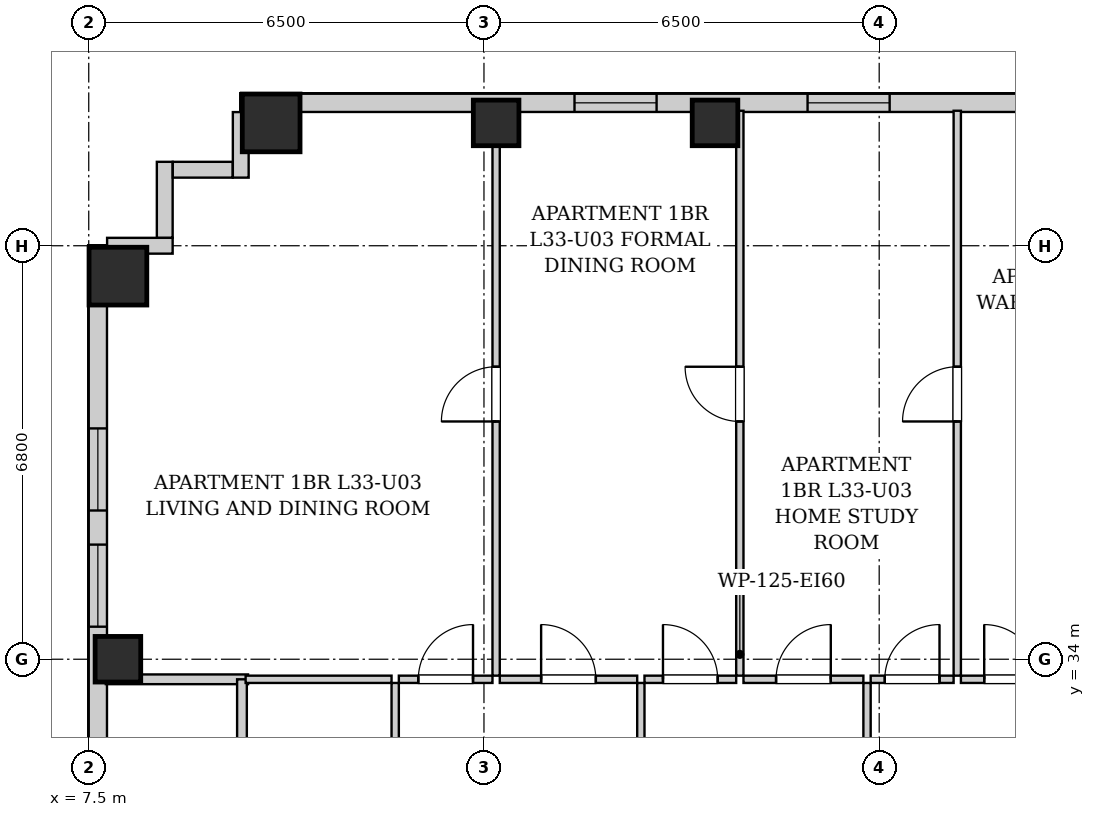
"""IFC4 building model, lengths in metres.
Left out: names, types, materials, properties, quantities, classifications, styles, units other than length and angle.
Written with IfcOpenShell. Run it as: python <this file> out.ifc"""

import sys

from ifc_helpers import new_model, si_unit, direction, frame, frame_2d, origin, origin_2d, place, context, subcontext, project, spatial, rectangle, extrude, element, fill, save


model = new_model("IFC4")
c1 = context("Model", 3, precision=1e-05, world=origin(), true_north=direction((0.0, 1.0)))
c2 = subcontext(c1, "Body", "Model", "MODEL_VIEW")
j1 = project(units=[si_unit("LENGTHUNIT", "METRE"), si_unit("PLANEANGLEUNIT", "RADIAN")], contexts=[c1])
p1 = place(None, origin())
s1 = spatial("IfcSite", under=j1, at=p1, CompositionType="ELEMENT")
p2 = place(p1, origin())
s2 = spatial("IfcBuilding", under=s1, at=p2, CompositionType="ELEMENT")
p3 = place(p2, frame((0.0, 0.0, 116.7)))
s3 = spatial("IfcBuildingStorey", under=s2, at=p3, CompositionType="ELEMENT", Elevation=116.7)
p4 = place(p3, frame((10.5, 42.82, 0.0), z_axis=(0.0, 0.0, 1.0), x_axis=(1.0, 0.0, 0.0)))
e1 = element("IfcColumn", 1, at=p4, inside=s3, PredefinedType="COLUMN", context=c2, shape_type="SweptSolid", body=[
    extrude(rectangle(XDim=0.95, YDim=0.95, at=origin_2d()), origin(), (0.0, 0.0, 1.0), 3.2),
])
for number, where, z_axis, x_axis in (
    (2, (14.2, 42.82, 0.0), (0.0, 0.0, 1.0), (1.0, 0.0, 0.0)),
    (3, (17.8, 42.82, 0.0), (0.0, 0.0, 1.0), (1.0, 0.0, 0.0)),
    (4, (7.98, 34.0, 0.0), (0.0, 0.0, 1.0), (1.0, 0.0, 0.0)),
):
    element("IfcColumn", number, at=place(p3, frame(where, z_axis=z_axis, x_axis=x_axis)), inside=s3, PredefinedType="COLUMN", context=c2, shape_type="SweptSolid", body=[
        extrude(rectangle(XDim=0.75, YDim=0.75, at=origin_2d()), origin(), (0.0, 0.0, 1.0), 3.2),
    ])
p5 = place(p3, frame((7.98, 40.3, 0.0), z_axis=(0.0, 0.0, 1.0), x_axis=(1.0, 0.0, 0.0)))
e5 = element("IfcColumn", 5, at=p5, inside=s3, PredefinedType="COLUMN", context=c2, shape_type="SweptSolid", body=[
    extrude(rectangle(XDim=0.95, YDim=0.95, at=origin_2d()), origin(), (0.0, 0.0, 1.0), 3.2),
])
p6 = place(p3, frame((10.0, 43.15, 0.0), z_axis=(0.0, 0.0, 1.0), x_axis=(1.0, 0.0, 0.0)))
e6 = element("IfcWall", 6, at=p6, inside=s3, PredefinedType="SOLIDWALL", context=c2, shape_type="SweptSolid", body=[
    extrude(rectangle(XDim=21.95, YDim=0.3, at=frame_2d((10.975, 0.0))), origin(), (0.0, 0.0, 1.0), 2.88),
])
p7 = place(p6, frame((5.489, 0.0, 0.55)))
e7 = element("IfcOpeningElement", 7, at=p7, cuts=e6, PredefinedType="OPENING", context=c2, shape_type="SweptSolid", body=[
    extrude(rectangle(XDim=1.35, YDim=1.2, at=frame_2d((0.675, 0.6))), frame((0.0, 0.16, 0.0), z_axis=(0.0, -1.0, 0.0), x_axis=(1.0, 0.0, 0.0)), (0.0, 0.0, 1.0), 0.32),
])
p8 = place(p6, frame((9.322, 0.0, 0.55)))
e8 = element("IfcOpeningElement", 8, at=p8, cuts=e6, PredefinedType="OPENING", context=c2, shape_type="SweptSolid", body=[
    extrude(rectangle(XDim=1.35, YDim=1.2, at=frame_2d((0.675, 0.6))), frame((0.0, 0.16, 0.0), z_axis=(0.0, -1.0, 0.0), x_axis=(1.0, 0.0, 0.0)), (0.0, 0.0, 1.0), 0.32),
])
p9 = place(p6, frame((18.869, 0.0, 0.55)))
e9 = element("IfcOpeningElement", 9, at=p9, cuts=e6, PredefinedType="OPENING", context=c2, shape_type="SweptSolid", body=[
    extrude(rectangle(XDim=1.35, YDim=1.2, at=frame_2d((0.675, 0.6))), frame((0.0, 0.16, 0.0), z_axis=(0.0, -1.0, 0.0), x_axis=(1.0, 0.0, 0.0)), (0.0, 0.0, 1.0), 0.32),
])
p10 = place(p3, frame((7.65, 2.5, 0.0), z_axis=(0.0, 0.0, 1.0), x_axis=(0.0, 1.0, 0.0)))
e10 = element("IfcWall", 10, at=p10, inside=s3, PredefinedType="SOLIDWALL", context=c2, shape_type="SweptSolid", body=[
    extrude(rectangle(XDim=38.3, YDim=0.3, at=frame_2d((19.15, 0.0))), origin(), (0.0, 0.0, 1.0), 2.88),
])
p11 = place(p10, frame((3.38, 0.0, 0.55)))
e11 = element("IfcOpeningElement", 11, at=p11, cuts=e10, PredefinedType="OPENING", context=c2, shape_type="SweptSolid", body=[
    extrude(rectangle(XDim=1.35, YDim=1.2, at=frame_2d((0.675, 0.6))), frame((0.0, 0.16, 0.0), z_axis=(0.0, -1.0, 0.0), x_axis=(1.0, 0.0, 0.0)), (0.0, 0.0, 1.0), 0.32),
])
p12 = place(p10, frame((1.135, 0.0, 0.55)))
e12 = element("IfcOpeningElement", 12, at=p12, cuts=e10, PredefinedType="OPENING", context=c2, shape_type="SweptSolid", body=[
    extrude(rectangle(XDim=1.35, YDim=1.2, at=frame_2d((0.675, 0.6))), frame((0.0, 0.16, 0.0), z_axis=(0.0, -1.0, 0.0), x_axis=(1.0, 0.0, 0.0)), (0.0, 0.0, 1.0), 0.32),
])
p13 = place(p10, frame((33.946, 0.0, 0.55)))
e13 = element("IfcOpeningElement", 13, at=p13, cuts=e10, PredefinedType="OPENING", context=c2, shape_type="SweptSolid", body=[
    extrude(rectangle(XDim=1.35, YDim=1.2, at=frame_2d((0.675, 0.6))), frame((0.0, 0.16, 0.0), z_axis=(0.0, -1.0, 0.0), x_axis=(1.0, 0.0, 0.0)), (0.0, 0.0, 1.0), 0.32),
])
p14 = place(p10, frame((32.035, 0.0, 0.55)))
e14 = element("IfcOpeningElement", 14, at=p14, cuts=e10, PredefinedType="OPENING", context=c2, shape_type="SweptSolid", body=[
    extrude(rectangle(XDim=1.35, YDim=1.2, at=frame_2d((0.675, 0.6))), frame((0.0, 0.16, 0.0), z_axis=(0.0, -1.0, 0.0), x_axis=(1.0, 0.0, 0.0)), (0.0, 0.0, 1.0), 0.32),
])
p15 = place(p10, frame((15.65, 0.0, 0.55)))
e15 = element("IfcOpeningElement", 15, at=p15, cuts=e10, PredefinedType="OPENING", context=c2, shape_type="SweptSolid", body=[
    extrude(rectangle(XDim=1.35, YDim=1.2, at=frame_2d((0.675, 0.6))), frame((0.0, 0.16, 0.0), z_axis=(0.0, -1.0, 0.0), x_axis=(1.0, 0.0, 0.0)), (0.0, 0.0, 1.0), 0.32),
])
p16 = place(p10, frame((13.035, 0.0, 0.55)))
e16 = element("IfcOpeningElement", 16, at=p16, cuts=e10, PredefinedType="OPENING", context=c2, shape_type="SweptSolid", body=[
    extrude(rectangle(XDim=1.35, YDim=1.2, at=frame_2d((0.675, 0.6))), frame((0.0, 0.16, 0.0), z_axis=(0.0, -1.0, 0.0), x_axis=(1.0, 0.0, 0.0)), (0.0, 0.0, 1.0), 0.32),
])
p17 = place(p10, frame((22.831, 0.0, 0.55)))
e17 = element("IfcOpeningElement", 17, at=p17, cuts=e10, PredefinedType="OPENING", context=c2, shape_type="SweptSolid", body=[
    extrude(rectangle(XDim=1.35, YDim=1.2, at=frame_2d((0.675, 0.6))), frame((0.0, 0.16, 0.0), z_axis=(0.0, -1.0, 0.0), x_axis=(1.0, 0.0, 0.0)), (0.0, 0.0, 1.0), 0.32),
])
p18 = place(p10, frame((24.441, 0.0, 0.55)))
e18 = element("IfcOpeningElement", 18, at=p18, cuts=e10, PredefinedType="OPENING", context=c2, shape_type="SweptSolid", body=[
    extrude(rectangle(XDim=1.35, YDim=1.2, at=frame_2d((0.675, 0.6))), frame((0.0, 0.16, 0.0), z_axis=(0.0, -1.0, 0.0), x_axis=(1.0, 0.0, 0.0)), (0.0, 0.0, 1.0), 0.32),
])
p19 = place(p3, frame((7.802, 40.8, 0.0), z_axis=(0.0, 0.0, 1.0), x_axis=(1.0, 0.0, 0.0)))
e19 = element("IfcWall", 19, at=p19, inside=s3, PredefinedType="SOLIDWALL", context=c2, shape_type="SweptSolid", body=[
    extrude(rectangle(XDim=1.078, YDim=0.26, at=frame_2d((0.539, 0.0))), origin(), (0.0, 0.0, 1.0), 2.88),
])
p20 = place(p3, frame((8.75, 40.932, 0.0), z_axis=(0.0, 0.0, 1.0), x_axis=(0.0, 1.0, 0.0)))
e20 = element("IfcWall", 20, at=p20, inside=s3, PredefinedType="SOLIDWALL", context=c2, shape_type="SweptSolid", body=[
    extrude(rectangle(XDim=1.248, YDim=0.26, at=frame_2d((0.624, 0.0))), origin(), (0.0, 0.0, 1.0), 2.88),
])
p21 = place(p3, frame((8.882, 42.05, 0.0), z_axis=(0.0, 0.0, 1.0), x_axis=(1.0, 0.0, 0.0)))
e21 = element("IfcWall", 21, at=p21, inside=s3, PredefinedType="SOLIDWALL", context=c2, shape_type="SweptSolid", body=[
    extrude(rectangle(XDim=0.986, YDim=0.26, at=frame_2d((0.493, 0.0))), origin(), (0.0, 0.0, 1.0), 2.88),
])
p22 = place(p3, frame((10.0, 41.92, 0.0), z_axis=(0.0, 0.0, 1.0), x_axis=(0.0, 1.0, 0.0)))
e22 = element("IfcWall", 22, at=p22, inside=s3, PredefinedType="SOLIDWALL", context=c2, shape_type="SweptSolid", body=[
    extrude(rectangle(XDim=1.078, YDim=0.26, at=frame_2d((0.539, 0.0))), origin(), (0.0, 0.0, 1.0), 2.88),
])
p23 = place(p3, frame((7.78, 33.67, 0.0), z_axis=(0.0, 0.0, 1.0), x_axis=(1.0, 0.0, 0.0)))
e23 = element("IfcWall", 23, at=p23, inside=s3, PredefinedType="PARTITIONING", context=c2, shape_type="SweptSolid", body=[
    extrude(rectangle(XDim=2.34, YDim=0.16, at=frame_2d((1.17, 0.0))), origin(), (0.0, 0.0, 1.0), 2.88),
])
p24 = place(p3, frame((10.02, 30.76, 0.0), z_axis=(0.0, 0.0, 1.0), x_axis=(0.0, 1.0, 0.0)))
e24 = element("IfcWall", 24, at=p24, inside=s3, PredefinedType="PARTITIONING", context=c2, shape_type="SweptSolid", body=[
    extrude(rectangle(XDim=2.91, YDim=0.16, at=frame_2d((1.455, 0.0))), origin(), (0.0, 0.0, 1.0), 2.88),
])
p25 = place(p3, frame((12.54, 30.76, 0.0), z_axis=(0.0, 0.0, 1.0), x_axis=(0.0, 1.0, 0.0)))
e25 = element("IfcWall", 25, at=p25, inside=s3, PredefinedType="PARTITIONING", context=c2, shape_type="SweptSolid", body=[
    extrude(rectangle(XDim=2.85, YDim=0.12, at=frame_2d((1.425, 0.0))), origin(), (0.0, 0.0, 1.0), 2.88),
])
p26 = place(p25, frame((0.995, 0.0, 0.0)))
e26 = element("IfcOpeningElement", 26, at=p26, cuts=e25, PredefinedType="OPENING", context=c2, shape_type="SweptSolid", body=[
    extrude(rectangle(XDim=0.86, YDim=2.05, at=frame_2d((0.43, 1.025))), frame((0.0, 0.07, 0.0), z_axis=(0.0, -1.0, 0.0), x_axis=(1.0, 0.0, 0.0)), (0.0, 0.0, 1.0), 0.14),
])
p27 = place(p3, frame((10.08, 33.67, 0.0), z_axis=(0.0, 0.0, 1.0), x_axis=(1.0, 0.0, 0.0)))
e27 = element("IfcWall", 27, at=p27, inside=s3, PredefinedType="PARTITIONING", context=c2, shape_type="SweptSolid", body=[
    extrude(rectangle(XDim=2.4, YDim=0.12, at=frame_2d((1.2, 0.0))), origin(), (0.0, 0.0, 1.0), 2.88),
])
p28 = place(p3, frame((16.58, 30.76, 0.0), z_axis=(0.0, 0.0, 1.0), x_axis=(0.0, 1.0, 0.0)))
e28 = element("IfcWall", 28, at=p28, inside=s3, PredefinedType="PARTITIONING", context=c2, shape_type="SweptSolid", body=[
    extrude(rectangle(XDim=2.85, YDim=0.12, at=frame_2d((1.425, 0.0))), origin(), (0.0, 0.0, 1.0), 2.88),
])
p29 = place(p28, frame((0.975, 0.0, 0.0)))
e29 = element("IfcOpeningElement", 29, at=p29, cuts=e28, PredefinedType="OPENING", context=c2, shape_type="SweptSolid", body=[
    extrude(rectangle(XDim=0.9, YDim=2.05, at=frame_2d((0.45, 1.025))), frame((0.0, 0.07, 0.0), z_axis=(0.0, -1.0, 0.0), x_axis=(1.0, 0.0, 0.0)), (0.0, 0.0, 1.0), 0.14),
])
p30 = place(p3, frame((12.6, 33.67, 0.0), z_axis=(0.0, 0.0, 1.0), x_axis=(1.0, 0.0, 0.0)))
e30 = element("IfcWall", 30, at=p30, inside=s3, PredefinedType="PARTITIONING", context=c2, shape_type="SweptSolid", body=[
    extrude(rectangle(XDim=1.54, YDim=0.12, at=frame_2d((0.77, 0.0))), origin(), (0.0, 0.0, 1.0), 2.88),
])
p31 = place(p30, frame((0.32, 0.0, 0.0)))
e31 = element("IfcOpeningElement", 31, at=p31, cuts=e30, PredefinedType="OPENING", context=c2, shape_type="SweptSolid", body=[
    extrude(rectangle(XDim=0.9, YDim=2.05, at=frame_2d((0.45, 1.025))), frame((0.0, 0.07, 0.0), z_axis=(0.0, -1.0, 0.0), x_axis=(1.0, 0.0, 0.0)), (0.0, 0.0, 1.0), 0.14),
])
p32 = place(p3, frame((14.26, 33.67, 0.0), z_axis=(0.0, 0.0, 1.0), x_axis=(1.0, 0.0, 0.0)))
e32 = element("IfcWall", 32, at=p32, inside=s3, PredefinedType="PARTITIONING", context=c2, shape_type="SweptSolid", body=[
    extrude(rectangle(XDim=2.26, YDim=0.12, at=frame_2d((1.13, 0.0))), origin(), (0.0, 0.0, 1.0), 2.88),
])
p33 = place(p32, frame((0.68, 0.0, 0.0)))
e33 = element("IfcOpeningElement", 33, at=p33, cuts=e32, PredefinedType="OPENING", context=c2, shape_type="SweptSolid", body=[
    extrude(rectangle(XDim=0.9, YDim=2.05, at=frame_2d((0.45, 1.025))), frame((0.0, 0.07, 0.0), z_axis=(0.0, -1.0, 0.0), x_axis=(1.0, 0.0, 0.0)), (0.0, 0.0, 1.0), 0.14),
])
p34 = place(p3, frame((20.3, 30.76, 0.0), z_axis=(0.0, 0.0, 1.0), x_axis=(0.0, 1.0, 0.0)))
e34 = element("IfcWall", 34, at=p34, inside=s3, PredefinedType="PARTITIONING", context=c2, shape_type="SweptSolid", body=[
    extrude(rectangle(XDim=2.85, YDim=0.12, at=frame_2d((1.425, 0.0))), origin(), (0.0, 0.0, 1.0), 2.88),
])
p35 = place(p34, frame((0.975, 0.0, 0.0)))
e35 = element("IfcOpeningElement", 35, at=p35, cuts=e34, PredefinedType="OPENING", context=c2, shape_type="SweptSolid", body=[
    extrude(rectangle(XDim=0.9, YDim=2.05, at=frame_2d((0.45, 1.025))), frame((0.0, 0.07, 0.0), z_axis=(0.0, -1.0, 0.0), x_axis=(1.0, 0.0, 0.0)), (0.0, 0.0, 1.0), 0.14),
])
p36 = place(p3, frame((16.64, 33.67, 0.0), z_axis=(0.0, 0.0, 1.0), x_axis=(1.0, 0.0, 0.0)))
e36 = element("IfcWall", 36, at=p36, inside=s3, PredefinedType="PARTITIONING", context=c2, shape_type="SweptSolid", body=[
    extrude(rectangle(XDim=1.508, YDim=0.12, at=frame_2d((0.754, 0.0))), origin(), (0.0, 0.0, 1.0), 2.88),
])
p37 = place(p36, frame((0.304, 0.0, 0.0)))
e37 = element("IfcOpeningElement", 37, at=p37, cuts=e36, PredefinedType="OPENING", context=c2, shape_type="SweptSolid", body=[
    extrude(rectangle(XDim=0.9, YDim=2.05, at=frame_2d((0.45, 1.025))), frame((0.0, 0.07, 0.0), z_axis=(0.0, -1.0, 0.0), x_axis=(1.0, 0.0, 0.0)), (0.0, 0.0, 1.0), 0.14),
])
p38 = place(p3, frame((18.268, 33.67, 0.0), z_axis=(0.0, 0.0, 1.0), x_axis=(1.0, 0.0, 0.0)))
e38 = element("IfcWall", 38, at=p38, inside=s3, PredefinedType="PARTITIONING", context=c2, shape_type="SweptSolid", body=[
    extrude(rectangle(XDim=1.972, YDim=0.12, at=frame_2d((0.986, 0.0))), origin(), (0.0, 0.0, 1.0), 2.88),
])
p39 = place(p38, frame((0.536, 0.0, 0.0)))
e39 = element("IfcOpeningElement", 39, at=p39, cuts=e38, PredefinedType="OPENING", context=c2, shape_type="SweptSolid", body=[
    extrude(rectangle(XDim=0.9, YDim=2.05, at=frame_2d((0.45, 1.025))), frame((0.0, 0.07, 0.0), z_axis=(0.0, -1.0, 0.0), x_axis=(1.0, 0.0, 0.0)), (0.0, 0.0, 1.0), 0.14),
])
p40 = place(p3, frame((20.36, 33.67, 0.0), z_axis=(0.0, 0.0, 1.0), x_axis=(1.0, 0.0, 0.0)))
e40 = element("IfcWall", 40, at=p40, inside=s3, PredefinedType="PARTITIONING", context=c2, shape_type="SweptSolid", body=[
    extrude(rectangle(XDim=1.364, YDim=0.12, at=frame_2d((0.682, 0.0))), origin(), (0.0, 0.0, 1.0), 2.88),
])
p41 = place(p40, frame((0.232, 0.0, 0.0)))
e41 = element("IfcOpeningElement", 41, at=p41, cuts=e40, PredefinedType="OPENING", context=c2, shape_type="SweptSolid", body=[
    extrude(rectangle(XDim=0.9, YDim=2.05, at=frame_2d((0.45, 1.025))), frame((0.0, 0.07, 0.0), z_axis=(0.0, -1.0, 0.0), x_axis=(1.0, 0.0, 0.0)), (0.0, 0.0, 1.0), 0.14),
])
p42 = place(p3, frame((21.844, 33.67, 0.0), z_axis=(0.0, 0.0, 1.0), x_axis=(1.0, 0.0, 0.0)))
e42 = element("IfcWall", 42, at=p42, inside=s3, PredefinedType="PARTITIONING", context=c2, shape_type="SweptSolid", body=[
    extrude(rectangle(XDim=1.666, YDim=0.12, at=frame_2d((0.833, 0.0))), origin(), (0.0, 0.0, 1.0), 2.88),
])
p43 = place(p42, frame((0.383, 0.0, 0.0)))
e43 = element("IfcOpeningElement", 43, at=p43, cuts=e42, PredefinedType="OPENING", context=c2, shape_type="SweptSolid", body=[
    extrude(rectangle(XDim=0.9, YDim=2.05, at=frame_2d((0.45, 1.025))), frame((0.0, 0.07, 0.0), z_axis=(0.0, -1.0, 0.0), x_axis=(1.0, 0.0, 0.0)), (0.0, 0.0, 1.0), 0.14),
])
p44 = place(p3, frame((14.2, 33.73, 0.0), z_axis=(0.0, 0.0, 1.0), x_axis=(0.0, 1.0, 0.0)))
e44 = element("IfcWall", 44, at=p44, inside=s3, PredefinedType="PARTITIONING", context=c2, shape_type="SweptSolid", body=[
    extrude(rectangle(XDim=9.29, YDim=0.12, at=frame_2d((4.645, 0.0))), origin(), (0.0, 0.0, 1.0), 2.88),
])
p45 = place(p44, frame((4.18, 0.0, 0.0)))
e45 = element("IfcOpeningElement", 45, at=p45, cuts=e44, PredefinedType="OPENING", context=c2, shape_type="SweptSolid", body=[
    extrude(rectangle(XDim=0.9, YDim=2.05, at=frame_2d((0.45, 1.025))), frame((0.0, 0.07, 0.0), z_axis=(0.0, -1.0, 0.0), x_axis=(1.0, 0.0, 0.0)), (0.0, 0.0, 1.0), 0.14),
])
p46 = place(p3, frame((18.208, 33.73, 0.0), z_axis=(0.0, 0.0, 1.0), x_axis=(0.0, 1.0, 0.0)))
e46 = element("IfcWall", 46, at=p46, inside=s3, PredefinedType="PARTITIONING", context=c2, shape_type="SweptSolid", body=[
    extrude(rectangle(XDim=9.29, YDim=0.12, at=frame_2d((4.645, 0.0))), origin(), (0.0, 0.0, 1.0), 2.88),
])
p47 = place(p46, frame((4.18, 0.0, 0.0)))
e47 = element("IfcOpeningElement", 47, at=p47, cuts=e46, PredefinedType="OPENING", context=c2, shape_type="SweptSolid", body=[
    extrude(rectangle(XDim=0.9, YDim=2.05, at=frame_2d((0.45, 1.025))), frame((0.0, 0.07, 0.0), z_axis=(0.0, -1.0, 0.0), x_axis=(1.0, 0.0, 0.0)), (0.0, 0.0, 1.0), 0.14),
])
p48 = place(p3, frame((21.784, 33.73, 0.0), z_axis=(0.0, 0.0, 1.0), x_axis=(0.0, 1.0, 0.0)))
e48 = element("IfcWall", 48, at=p48, inside=s3, PredefinedType="PARTITIONING", context=c2, shape_type="SweptSolid", body=[
    extrude(rectangle(XDim=9.29, YDim=0.12, at=frame_2d((4.645, 0.0))), origin(), (0.0, 0.0, 1.0), 2.88),
])
p49 = place(p48, frame((4.18, 0.0, 0.0)))
e49 = element("IfcOpeningElement", 49, at=p49, cuts=e48, PredefinedType="OPENING", context=c2, shape_type="SweptSolid", body=[
    extrude(rectangle(XDim=0.9, YDim=2.05, at=frame_2d((0.45, 1.025))), frame((0.0, 0.07, 0.0), z_axis=(0.0, -1.0, 0.0), x_axis=(1.0, 0.0, 0.0)), (0.0, 0.0, 1.0), 0.14),
])
p50 = place(p31, origin())
e50 = element("IfcDoor", 50, at=p50, inside=s3, OperationType="SINGLE_SWING_RIGHT", PredefinedType="DOOR", context=c2, shape_type="SweptSolid", body=[
    extrude(rectangle(XDim=0.9, YDim=2.05, at=frame_2d((0.45, 1.025))), frame((0.0, 0.025, 0.0), z_axis=(0.0, -1.0, 0.0), x_axis=(1.0, 0.0, 0.0)), (0.0, 0.0, 1.0), 0.05),
])
fill(e31, e50)
p51 = place(p33, origin())
e51 = element("IfcDoor", 51, at=p51, inside=s3, OperationType="SINGLE_SWING_LEFT", PredefinedType="DOOR", context=c2, shape_type="SweptSolid", body=[
    extrude(rectangle(XDim=0.9, YDim=2.05, at=frame_2d((0.45, 1.025))), frame((0.0, 0.025, 0.0), z_axis=(0.0, -1.0, 0.0), x_axis=(1.0, 0.0, 0.0)), (0.0, 0.0, 1.0), 0.05),
])
fill(e33, e51)
p52 = place(p37, origin())
e52 = element("IfcDoor", 52, at=p52, inside=s3, OperationType="SINGLE_SWING_LEFT", PredefinedType="DOOR", context=c2, shape_type="SweptSolid", body=[
    extrude(rectangle(XDim=0.9, YDim=2.05, at=frame_2d((0.45, 1.025))), frame((0.0, 0.025, 0.0), z_axis=(0.0, -1.0, 0.0), x_axis=(1.0, 0.0, 0.0)), (0.0, 0.0, 1.0), 0.05),
])
fill(e37, e52)
p53 = place(p39, origin())
e53 = element("IfcDoor", 53, at=p53, inside=s3, OperationType="SINGLE_SWING_RIGHT", PredefinedType="DOOR", context=c2, shape_type="SweptSolid", body=[
    extrude(rectangle(XDim=0.9, YDim=2.05, at=frame_2d((0.45, 1.025))), frame((0.0, 0.025, 0.0), z_axis=(0.0, -1.0, 0.0), x_axis=(1.0, 0.0, 0.0)), (0.0, 0.0, 1.0), 0.05),
])
fill(e39, e53)
p54 = place(p41, origin())
e54 = element("IfcDoor", 54, at=p54, inside=s3, OperationType="SINGLE_SWING_RIGHT", PredefinedType="DOOR", context=c2, shape_type="SweptSolid", body=[
    extrude(rectangle(XDim=0.9, YDim=2.05, at=frame_2d((0.45, 1.025))), frame((0.0, 0.025, 0.0), z_axis=(0.0, -1.0, 0.0), x_axis=(1.0, 0.0, 0.0)), (0.0, 0.0, 1.0), 0.05),
])
fill(e41, e54)
p55 = place(p43, origin())
e55 = element("IfcDoor", 55, at=p55, inside=s3, OperationType="SINGLE_SWING_LEFT", PredefinedType="DOOR", context=c2, shape_type="SweptSolid", body=[
    extrude(rectangle(XDim=0.9, YDim=2.05, at=frame_2d((0.45, 1.025))), frame((0.0, 0.025, 0.0), z_axis=(0.0, -1.0, 0.0), x_axis=(1.0, 0.0, 0.0)), (0.0, 0.0, 1.0), 0.05),
])
fill(e43, e55)
p56 = place(p45, origin())
e56 = element("IfcDoor", 56, at=p56, inside=s3, OperationType="SINGLE_SWING_LEFT", PredefinedType="DOOR", context=c2, shape_type="SweptSolid", body=[
    extrude(rectangle(XDim=0.9, YDim=2.05, at=frame_2d((0.45, 1.025))), frame((0.0, 0.025, 0.0), z_axis=(0.0, -1.0, 0.0), x_axis=(1.0, 0.0, 0.0)), (0.0, 0.0, 1.0), 0.05),
])
fill(e45, e56)
p57 = place(p47, origin())
e57 = element("IfcDoor", 57, at=p57, inside=s3, OperationType="SINGLE_SWING_RIGHT", PredefinedType="DOOR", context=c2, shape_type="SweptSolid", body=[
    extrude(rectangle(XDim=0.9, YDim=2.05, at=frame_2d((0.45, 1.025))), frame((0.0, 0.025, 0.0), z_axis=(0.0, -1.0, 0.0), x_axis=(1.0, 0.0, 0.0)), (0.0, 0.0, 1.0), 0.05),
])
fill(e47, e57)
p58 = place(p49, origin())
e58 = element("IfcDoor", 58, at=p58, inside=s3, OperationType="SINGLE_SWING_LEFT", PredefinedType="DOOR", context=c2, shape_type="SweptSolid", body=[
    extrude(rectangle(XDim=0.9, YDim=2.05, at=frame_2d((0.45, 1.025))), frame((0.0, 0.025, 0.0), z_axis=(0.0, -1.0, 0.0), x_axis=(1.0, 0.0, 0.0)), (0.0, 0.0, 1.0), 0.05),
])
fill(e49, e58)
p59 = place(p13, origin())
e59 = element("IfcWindow", 59, at=p59, inside=s3, PartitioningType="SINGLE_PANEL", PredefinedType="WINDOW", context=c2, shape_type="SweptSolid", body=[
    extrude(rectangle(XDim=1.35, YDim=1.2, at=frame_2d((0.675, 0.6))), frame((0.0, 0.03, 0.0), z_axis=(0.0, -1.0, 0.0), x_axis=(1.0, 0.0, 0.0)), (0.0, 0.0, 1.0), 0.06),
])
fill(e13, e59)
p60 = place(p14, origin())
e60 = element("IfcWindow", 60, at=p60, inside=s3, PartitioningType="SINGLE_PANEL", PredefinedType="WINDOW", context=c2, shape_type="SweptSolid", body=[
    extrude(rectangle(XDim=1.35, YDim=1.2, at=frame_2d((0.675, 0.6))), frame((0.0, 0.03, 0.0), z_axis=(0.0, -1.0, 0.0), x_axis=(1.0, 0.0, 0.0)), (0.0, 0.0, 1.0), 0.06),
])
fill(e14, e60)
p61 = place(p7, origin())
e61 = element("IfcWindow", 61, at=p61, inside=s3, PartitioningType="SINGLE_PANEL", PredefinedType="WINDOW", context=c2, shape_type="SweptSolid", body=[
    extrude(rectangle(XDim=1.35, YDim=1.2, at=frame_2d((0.675, 0.6))), frame((0.0, 0.03, 0.0), z_axis=(0.0, -1.0, 0.0), x_axis=(1.0, 0.0, 0.0)), (0.0, 0.0, 1.0), 0.06),
])
fill(e7, e61)
p62 = place(p8, origin())
e62 = element("IfcWindow", 62, at=p62, inside=s3, PartitioningType="SINGLE_PANEL", PredefinedType="WINDOW", context=c2, shape_type="SweptSolid", body=[
    extrude(rectangle(XDim=1.35, YDim=1.2, at=frame_2d((0.675, 0.6))), frame((0.0, 0.03, 0.0), z_axis=(0.0, -1.0, 0.0), x_axis=(1.0, 0.0, 0.0)), (0.0, 0.0, 1.0), 0.06),
])
fill(e8, e62)
save(model, sys.argv[1])
